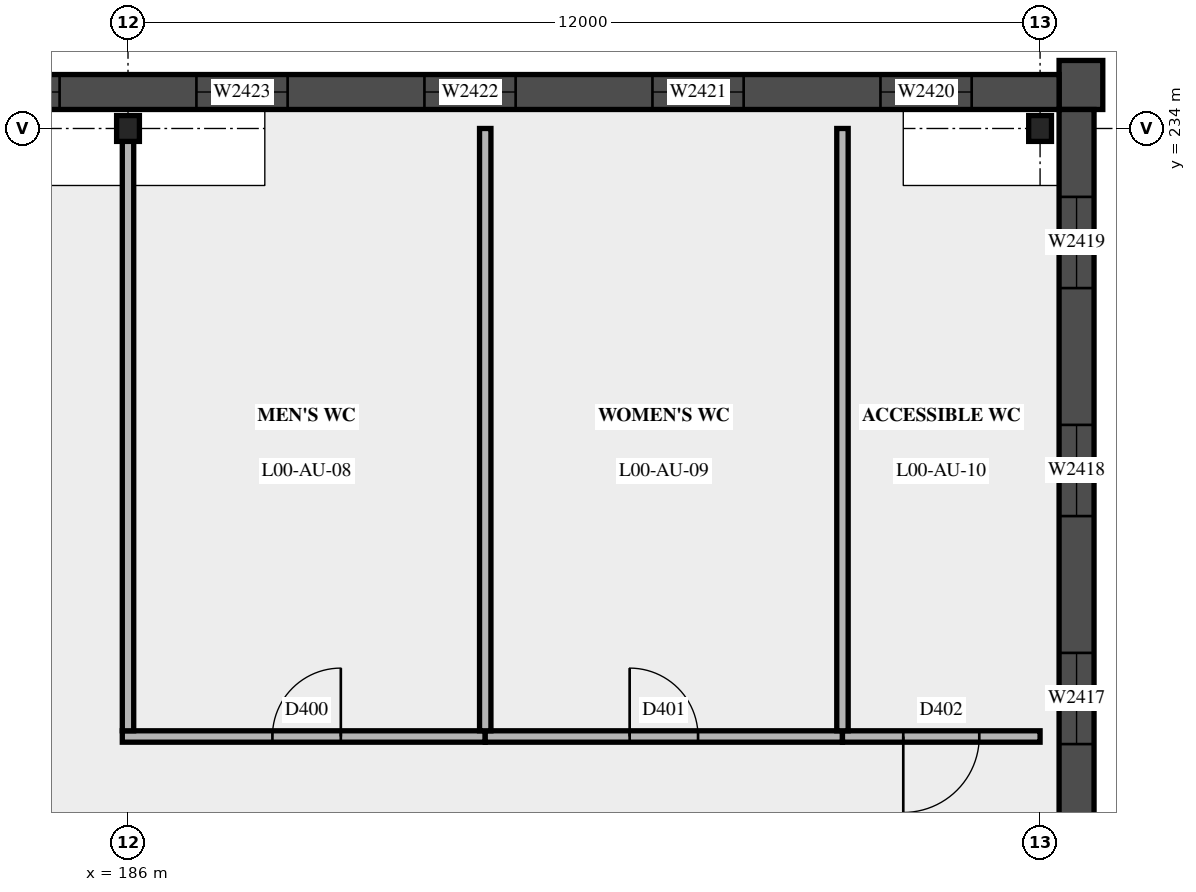
"""IFC4 building model, lengths in metres.
Left out: names, types, materials, properties, quantities, classifications, styles, units other than length and angle.
Written with IfcOpenShell. Run it as: python <this file> out.ifc"""

import sys

from ifc_helpers import new_model, si_unit, direction, frame, frame_2d, origin, origin_2d, place, context, subcontext, project, spatial, rectangle, i_section, extrude, element, fill, save


model = new_model("IFC4")
c1 = context("Model", 3, precision=1e-05, world=origin(), true_north=direction((0.0, 1.0)))
c2 = subcontext(c1, "Body", "Model", "MODEL_VIEW")
j1 = project(units=[si_unit("LENGTHUNIT", "METRE"), si_unit("PLANEANGLEUNIT", "RADIAN")], contexts=[c1])
p1 = place(None, origin())
s1 = spatial("IfcSite", under=j1, at=p1, CompositionType="ELEMENT")
p2 = place(p1, origin())
s2 = spatial("IfcBuilding", under=s1, at=p2, CompositionType="ELEMENT")
p3 = place(p2, origin())
s3 = spatial("IfcBuildingStorey", under=s2, at=p3, CompositionType="ELEMENT", Elevation=0.0)
for number, where, z_axis, x_axis in (
    (1, (186.0, 234.0, 0.0), (0.0, 0.0, 1.0), (1.0, 0.0, 0.0)),
    (2, (198.0, 234.0, 0.0), (0.0, 0.0, 1.0), (1.0, 0.0, 0.0)),
):
    element("IfcColumn", number, at=place(p3, frame(where, z_axis=z_axis, x_axis=x_axis)), inside=s3, PredefinedType="COLUMN", context=c2, shape_type="SweptSolid", body=[
        extrude(i_section(OverallWidth=0.3, OverallDepth=0.34, WebThickness=0.012, FlangeThickness=0.021, at=origin_2d()), origin(), (0.0, 0.0, 1.0), 5.4),
    ])
p4 = place(p3, frame((198.25, 234.573, 0.0), z_axis=(0.0, 0.0, 1.0), x_axis=(1.0, 0.0, 0.0)))
e3 = element("IfcWall", 3, at=p4, inside=s3, PredefinedType="SOLIDWALL", context=c2, shape_type="SweptSolid", body=[
    extrude(rectangle(XDim=0.575, YDim=0.645, at=frame_2d((0.288, 0.0))), origin(), (0.0, 0.0, 1.0), 5.01),
])
p5 = place(p3, frame((198.48, 197.75, 0.0), z_axis=(0.0, 0.0, 1.0), x_axis=(0.0, 1.0, 0.0)))
e4 = element("IfcWall", 4, at=p5, inside=s3, PredefinedType="SOLIDWALL", context=c2, shape_type="SweptSolid", body=[
    extrude(rectangle(XDim=36.5, YDim=0.46, at=frame_2d((18.25, 0.0))), origin(), (0.0, 0.0, 1.0), 5.4),
])
p6 = place(p5, frame((1.65, 0.0, 0.0), z_axis=(0.0, 0.0, 1.0), x_axis=(-1.0, 0.0, 0.0)))
e5 = element("IfcOpeningElement", 5, at=p6, cuts=e4, PredefinedType="OPENING", context=c2, shape_type="SweptSolid", body=[
    extrude(rectangle(XDim=1.0, YDim=2.1, at=frame_2d((0.5, 1.05))), frame((0.0, 0.24, 0.0), z_axis=(0.0, -1.0, 0.0), x_axis=(1.0, 0.0, 0.0)), (0.0, 0.0, 1.0), 0.48),
])
p7 = place(p5, frame((20.75, 0.0, 0.0), z_axis=(0.0, 0.0, 1.0), x_axis=(-1.0, 0.0, 0.0)))
e6 = element("IfcOpeningElement", 6, at=p7, cuts=e4, PredefinedType="OPENING", context=c2, shape_type="SweptSolid", body=[
    extrude(rectangle(XDim=1.0, YDim=2.1, at=frame_2d((0.5, 1.05))), frame((0.0, 0.24, 0.0), z_axis=(0.0, -1.0, 0.0), x_axis=(1.0, 0.0, 0.0)), (0.0, 0.0, 1.0), 0.48),
])
p8 = place(p5, frame((4.15, 0.0, 0.9)))
e7 = element("IfcOpeningElement", 7, at=p8, cuts=e4, PredefinedType="OPENING", context=c2, shape_type="SweptSolid", body=[
    extrude(rectangle(XDim=1.2, YDim=3.3, at=frame_2d((0.6, 1.65))), frame((0.0, 0.24, 0.0), z_axis=(0.0, -1.0, 0.0), x_axis=(1.0, 0.0, 0.0)), (0.0, 0.0, 1.0), 0.48),
])
p9 = place(p5, frame((7.15, 0.0, 0.9)))
e8 = element("IfcOpeningElement", 8, at=p9, cuts=e4, PredefinedType="OPENING", context=c2, shape_type="SweptSolid", body=[
    extrude(rectangle(XDim=1.2, YDim=3.3, at=frame_2d((0.6, 1.65))), frame((0.0, 0.24, 0.0), z_axis=(0.0, -1.0, 0.0), x_axis=(1.0, 0.0, 0.0)), (0.0, 0.0, 1.0), 0.48),
])
p10 = place(p5, frame((10.15, 0.0, 0.9)))
e9 = element("IfcOpeningElement", 9, at=p10, cuts=e4, PredefinedType="OPENING", context=c2, shape_type="SweptSolid", body=[
    extrude(rectangle(XDim=1.2, YDim=3.3, at=frame_2d((0.6, 1.65))), frame((0.0, 0.24, 0.0), z_axis=(0.0, -1.0, 0.0), x_axis=(1.0, 0.0, 0.0)), (0.0, 0.0, 1.0), 0.48),
])
p11 = place(p5, frame((13.15, 0.0, 0.9)))
e10 = element("IfcOpeningElement", 10, at=p11, cuts=e4, PredefinedType="OPENING", context=c2, shape_type="SweptSolid", body=[
    extrude(rectangle(XDim=1.2, YDim=3.3, at=frame_2d((0.6, 1.65))), frame((0.0, 0.24, 0.0), z_axis=(0.0, -1.0, 0.0), x_axis=(1.0, 0.0, 0.0)), (0.0, 0.0, 1.0), 0.48),
])
p12 = place(p5, frame((16.15, 0.0, 0.9)))
e11 = element("IfcOpeningElement", 11, at=p12, cuts=e4, PredefinedType="OPENING", context=c2, shape_type="SweptSolid", body=[
    extrude(rectangle(XDim=1.2, YDim=3.3, at=frame_2d((0.6, 1.65))), frame((0.0, 0.24, 0.0), z_axis=(0.0, -1.0, 0.0), x_axis=(1.0, 0.0, 0.0)), (0.0, 0.0, 1.0), 0.48),
])
p13 = place(p5, frame((22.15, 0.0, 0.9)))
e12 = element("IfcOpeningElement", 12, at=p13, cuts=e4, PredefinedType="OPENING", context=c2, shape_type="SweptSolid", body=[
    extrude(rectangle(XDim=1.2, YDim=3.3, at=frame_2d((0.6, 1.65))), frame((0.0, 0.24, 0.0), z_axis=(0.0, -1.0, 0.0), x_axis=(1.0, 0.0, 0.0)), (0.0, 0.0, 1.0), 0.48),
])
p14 = place(p5, frame((25.15, 0.0, 0.9)))
e13 = element("IfcOpeningElement", 13, at=p14, cuts=e4, PredefinedType="OPENING", context=c2, shape_type="SweptSolid", body=[
    extrude(rectangle(XDim=1.2, YDim=3.3, at=frame_2d((0.6, 1.65))), frame((0.0, 0.24, 0.0), z_axis=(0.0, -1.0, 0.0), x_axis=(1.0, 0.0, 0.0)), (0.0, 0.0, 1.0), 0.48),
])
p15 = place(p5, frame((28.15, 0.0, 0.9)))
e14 = element("IfcOpeningElement", 14, at=p15, cuts=e4, PredefinedType="OPENING", context=c2, shape_type="SweptSolid", body=[
    extrude(rectangle(XDim=1.2, YDim=3.3, at=frame_2d((0.6, 1.65))), frame((0.0, 0.24, 0.0), z_axis=(0.0, -1.0, 0.0), x_axis=(1.0, 0.0, 0.0)), (0.0, 0.0, 1.0), 0.48),
])
p16 = place(p5, frame((31.15, 0.0, 0.9)))
e15 = element("IfcOpeningElement", 15, at=p16, cuts=e4, PredefinedType="OPENING", context=c2, shape_type="SweptSolid", body=[
    extrude(rectangle(XDim=1.2, YDim=3.3, at=frame_2d((0.6, 1.65))), frame((0.0, 0.24, 0.0), z_axis=(0.0, -1.0, 0.0), x_axis=(1.0, 0.0, 0.0)), (0.0, 0.0, 1.0), 0.48),
])
p17 = place(p5, frame((34.15, 0.0, 0.9)))
e16 = element("IfcOpeningElement", 16, at=p17, cuts=e4, PredefinedType="OPENING", context=c2, shape_type="SweptSolid", body=[
    extrude(rectangle(XDim=1.2, YDim=3.3, at=frame_2d((0.6, 1.65))), frame((0.0, 0.24, 0.0), z_axis=(0.0, -1.0, 0.0), x_axis=(1.0, 0.0, 0.0)), (0.0, 0.0, 1.0), 0.48),
])
p18 = place(p3, frame((198.25, 234.48, 0.0), z_axis=(0.0, 0.0, 1.0), x_axis=(-1.0, 0.0, 0.0)))
e17 = element("IfcWall", 17, at=p18, inside=s3, PredefinedType="SOLIDWALL", context=c2, shape_type="SweptSolid", body=[
    extrude(rectangle(XDim=36.5, YDim=0.46, at=frame_2d((18.25, 0.0))), origin(), (0.0, 0.0, 1.0), 5.4),
])
p19 = place(p18, frame((18.75, 0.0, 0.0), z_axis=(0.0, 0.0, 1.0), x_axis=(-1.0, 0.0, 0.0)))
e18 = element("IfcOpeningElement", 18, at=p19, cuts=e17, PredefinedType="OPENING", context=c2, shape_type="SweptSolid", body=[
    extrude(rectangle(XDim=1.0, YDim=2.1, at=frame_2d((0.5, 1.05))), frame((0.0, 0.24, 0.0), z_axis=(0.0, -1.0, 0.0), x_axis=(1.0, 0.0, 0.0)), (0.0, 0.0, 1.0), 0.48),
])
p20 = place(p18, frame((30.75, 0.0, 0.0), z_axis=(0.0, 0.0, 1.0), x_axis=(-1.0, 0.0, 0.0)))
e19 = element("IfcOpeningElement", 19, at=p20, cuts=e17, PredefinedType="OPENING", context=c2, shape_type="SweptSolid", body=[
    extrude(rectangle(XDim=1.0, YDim=2.1, at=frame_2d((0.5, 1.05))), frame((0.0, 0.24, 0.0), z_axis=(0.0, -1.0, 0.0), x_axis=(1.0, 0.0, 0.0)), (0.0, 0.0, 1.0), 0.48),
])
p21 = place(p18, frame((1.15, 0.0, 0.9)))
e20 = element("IfcOpeningElement", 20, at=p21, cuts=e17, PredefinedType="OPENING", context=c2, shape_type="SweptSolid", body=[
    extrude(rectangle(XDim=1.2, YDim=3.3, at=frame_2d((0.6, 1.65))), frame((0.0, 0.24, 0.0), z_axis=(0.0, -1.0, 0.0), x_axis=(1.0, 0.0, 0.0)), (0.0, 0.0, 1.0), 0.48),
])
p22 = place(p18, frame((4.15, 0.0, 0.9)))
e21 = element("IfcOpeningElement", 21, at=p22, cuts=e17, PredefinedType="OPENING", context=c2, shape_type="SweptSolid", body=[
    extrude(rectangle(XDim=1.2, YDim=3.3, at=frame_2d((0.6, 1.65))), frame((0.0, 0.24, 0.0), z_axis=(0.0, -1.0, 0.0), x_axis=(1.0, 0.0, 0.0)), (0.0, 0.0, 1.0), 0.48),
])
p23 = place(p18, frame((7.15, 0.0, 0.9)))
e22 = element("IfcOpeningElement", 22, at=p23, cuts=e17, PredefinedType="OPENING", context=c2, shape_type="SweptSolid", body=[
    extrude(rectangle(XDim=1.2, YDim=3.3, at=frame_2d((0.6, 1.65))), frame((0.0, 0.24, 0.0), z_axis=(0.0, -1.0, 0.0), x_axis=(1.0, 0.0, 0.0)), (0.0, 0.0, 1.0), 0.48),
])
p24 = place(p18, frame((10.15, 0.0, 0.9)))
e23 = element("IfcOpeningElement", 23, at=p24, cuts=e17, PredefinedType="OPENING", context=c2, shape_type="SweptSolid", body=[
    extrude(rectangle(XDim=1.2, YDim=3.3, at=frame_2d((0.6, 1.65))), frame((0.0, 0.24, 0.0), z_axis=(0.0, -1.0, 0.0), x_axis=(1.0, 0.0, 0.0)), (0.0, 0.0, 1.0), 0.48),
])
p25 = place(p18, frame((13.15, 0.0, 0.9)))
e24 = element("IfcOpeningElement", 24, at=p25, cuts=e17, PredefinedType="OPENING", context=c2, shape_type="SweptSolid", body=[
    extrude(rectangle(XDim=1.2, YDim=3.3, at=frame_2d((0.6, 1.65))), frame((0.0, 0.24, 0.0), z_axis=(0.0, -1.0, 0.0), x_axis=(1.0, 0.0, 0.0)), (0.0, 0.0, 1.0), 0.48),
])
p26 = place(p18, frame((22.15, 0.0, 0.9)))
e25 = element("IfcOpeningElement", 25, at=p26, cuts=e17, PredefinedType="OPENING", context=c2, shape_type="SweptSolid", body=[
    extrude(rectangle(XDim=1.2, YDim=3.3, at=frame_2d((0.6, 1.65))), frame((0.0, 0.24, 0.0), z_axis=(0.0, -1.0, 0.0), x_axis=(1.0, 0.0, 0.0)), (0.0, 0.0, 1.0), 0.48),
])
p27 = place(p18, frame((25.15, 0.0, 0.9)))
e26 = element("IfcOpeningElement", 26, at=p27, cuts=e17, PredefinedType="OPENING", context=c2, shape_type="SweptSolid", body=[
    extrude(rectangle(XDim=1.2, YDim=3.3, at=frame_2d((0.6, 1.65))), frame((0.0, 0.24, 0.0), z_axis=(0.0, -1.0, 0.0), x_axis=(1.0, 0.0, 0.0)), (0.0, 0.0, 1.0), 0.48),
])
p28 = place(p18, frame((34.15, 0.0, 0.9)))
e27 = element("IfcOpeningElement", 27, at=p28, cuts=e17, PredefinedType="OPENING", context=c2, shape_type="SweptSolid", body=[
    extrude(rectangle(XDim=1.2, YDim=3.3, at=frame_2d((0.6, 1.65))), frame((0.0, 0.24, 0.0), z_axis=(0.0, -1.0, 0.0), x_axis=(1.0, 0.0, 0.0)), (0.0, 0.0, 1.0), 0.48),
])
p29 = place(p3, frame((185.925, 226.0, 0.0), z_axis=(0.0, 0.0, 1.0), x_axis=(1.0, 0.0, 0.0)))
e28 = element("IfcWall", 28, at=p29, inside=s3, PredefinedType="PARTITIONING", context=c2, shape_type="SweptSolid", body=[
    extrude(rectangle(XDim=4.775, YDim=0.15, at=frame_2d((2.387, 0.0))), origin(), (0.0, 0.0, 1.0), 5.15),
])
p30 = place(p29, frame((1.975, 0.0, 0.0)))
e29 = element("IfcOpeningElement", 29, at=p30, cuts=e28, PredefinedType="OPENING", context=c2, shape_type="SweptSolid", body=[
    extrude(rectangle(XDim=0.9, YDim=2.1, at=frame_2d((0.45, 1.05))), frame((0.0, 0.085, 0.0), z_axis=(0.0, -1.0, 0.0), x_axis=(1.0, 0.0, 0.0)), (0.0, 0.0, 1.0), 0.17),
])
p31 = place(p3, frame((190.7, 226.0, 0.0), z_axis=(0.0, 0.0, 1.0), x_axis=(1.0, 0.0, 0.0)))
e30 = element("IfcWall", 30, at=p31, inside=s3, PredefinedType="PARTITIONING", context=c2, shape_type="SweptSolid", body=[
    extrude(rectangle(XDim=4.7, YDim=0.15, at=frame_2d((2.35, 0.0))), origin(), (0.0, 0.0, 1.0), 5.15),
])
p32 = place(p31, frame((1.9, 0.0, 0.0)))
e31 = element("IfcOpeningElement", 31, at=p32, cuts=e30, PredefinedType="OPENING", context=c2, shape_type="SweptSolid", body=[
    extrude(rectangle(XDim=0.9, YDim=2.1, at=frame_2d((0.45, 1.05))), frame((0.0, 0.085, 0.0), z_axis=(0.0, -1.0, 0.0), x_axis=(1.0, 0.0, 0.0)), (0.0, 0.0, 1.0), 0.17),
])
p33 = place(p3, frame((195.4, 226.0, 0.0), z_axis=(0.0, 0.0, 1.0), x_axis=(1.0, 0.0, 0.0)))
e32 = element("IfcWall", 32, at=p33, inside=s3, PredefinedType="PARTITIONING", context=c2, shape_type="SweptSolid", body=[
    extrude(rectangle(XDim=2.6, YDim=0.15, at=frame_2d((1.3, 0.0))), origin(), (0.0, 0.0, 1.0), 5.15),
])
p34 = place(p33, frame((0.8, 0.0, 0.0)))
e33 = element("IfcOpeningElement", 33, at=p34, cuts=e32, PredefinedType="OPENING", context=c2, shape_type="SweptSolid", body=[
    extrude(rectangle(XDim=1.0, YDim=2.1, at=frame_2d((0.5, 1.05))), frame((0.0, 0.085, 0.0), z_axis=(0.0, -1.0, 0.0), x_axis=(1.0, 0.0, 0.0)), (0.0, 0.0, 1.0), 0.17),
])
for number, where, z_axis, x_axis in (
    (34, (186.0, 226.075, 0.0), (0.0, 0.0, 1.0), (0.0, 1.0, 0.0)),
    (35, (190.7, 226.075, 0.0), (0.0, 0.0, 1.0), (0.0, 1.0, 0.0)),
    (36, (195.4, 226.075, 0.0), (0.0, 0.0, 1.0), (0.0, 1.0, 0.0)),
):
    element("IfcWall", number, at=place(p3, frame(where, z_axis=z_axis, x_axis=x_axis)), inside=s3, PredefinedType="PARTITIONING", context=c2, shape_type="SweptSolid", body=[
        extrude(rectangle(XDim=7.925, YDim=0.15, at=frame_2d((3.962, 0.0))), origin(), (0.0, 0.0, 1.0), 5.15),
    ])
p35 = place(p15, origin())
e37 = element("IfcWindow", 37, at=p35, inside=s3, PartitioningType="SINGLE_PANEL", PredefinedType="WINDOW", context=c2, shape_type="SweptSolid", body=[
    extrude(rectangle(XDim=1.2, YDim=3.3, at=frame_2d((0.6, 1.65))), frame((0.0, 0.03, 0.0), z_axis=(0.0, -1.0, 0.0), x_axis=(1.0, 0.0, 0.0)), (0.0, 0.0, 1.0), 0.06),
])
fill(e14, e37)
p36 = place(p16, origin())
e38 = element("IfcWindow", 38, at=p36, inside=s3, PartitioningType="SINGLE_PANEL", PredefinedType="WINDOW", context=c2, shape_type="SweptSolid", body=[
    extrude(rectangle(XDim=1.2, YDim=3.3, at=frame_2d((0.6, 1.65))), frame((0.0, 0.03, 0.0), z_axis=(0.0, -1.0, 0.0), x_axis=(1.0, 0.0, 0.0)), (0.0, 0.0, 1.0), 0.06),
])
fill(e15, e38)
p37 = place(p17, origin())
e39 = element("IfcWindow", 39, at=p37, inside=s3, PartitioningType="SINGLE_PANEL", PredefinedType="WINDOW", context=c2, shape_type="SweptSolid", body=[
    extrude(rectangle(XDim=1.2, YDim=3.3, at=frame_2d((0.6, 1.65))), frame((0.0, 0.03, 0.0), z_axis=(0.0, -1.0, 0.0), x_axis=(1.0, 0.0, 0.0)), (0.0, 0.0, 1.0), 0.06),
])
fill(e16, e39)
p38 = place(p21, origin())
e40 = element("IfcWindow", 40, at=p38, inside=s3, PartitioningType="SINGLE_PANEL", PredefinedType="WINDOW", context=c2, shape_type="SweptSolid", body=[
    extrude(rectangle(XDim=1.2, YDim=3.3, at=frame_2d((0.6, 1.65))), frame((0.0, 0.03, 0.0), z_axis=(0.0, -1.0, 0.0), x_axis=(1.0, 0.0, 0.0)), (0.0, 0.0, 1.0), 0.06),
])
fill(e20, e40)
p39 = place(p22, origin())
e41 = element("IfcWindow", 41, at=p39, inside=s3, PartitioningType="SINGLE_PANEL", PredefinedType="WINDOW", context=c2, shape_type="SweptSolid", body=[
    extrude(rectangle(XDim=1.2, YDim=3.3, at=frame_2d((0.6, 1.65))), frame((0.0, 0.03, 0.0), z_axis=(0.0, -1.0, 0.0), x_axis=(1.0, 0.0, 0.0)), (0.0, 0.0, 1.0), 0.06),
])
fill(e21, e41)
p40 = place(p23, origin())
e42 = element("IfcWindow", 42, at=p40, inside=s3, PartitioningType="SINGLE_PANEL", PredefinedType="WINDOW", context=c2, shape_type="SweptSolid", body=[
    extrude(rectangle(XDim=1.2, YDim=3.3, at=frame_2d((0.6, 1.65))), frame((0.0, 0.03, 0.0), z_axis=(0.0, -1.0, 0.0), x_axis=(1.0, 0.0, 0.0)), (0.0, 0.0, 1.0), 0.06),
])
fill(e22, e42)
p41 = place(p24, origin())
e43 = element("IfcWindow", 43, at=p41, inside=s3, PartitioningType="SINGLE_PANEL", PredefinedType="WINDOW", context=c2, shape_type="SweptSolid", body=[
    extrude(rectangle(XDim=1.2, YDim=3.3, at=frame_2d((0.6, 1.65))), frame((0.0, 0.03, 0.0), z_axis=(0.0, -1.0, 0.0), x_axis=(1.0, 0.0, 0.0)), (0.0, 0.0, 1.0), 0.06),
])
fill(e23, e43)
p42 = place(p25, origin())
e44 = element("IfcWindow", 44, at=p42, inside=s3, PartitioningType="SINGLE_PANEL", PredefinedType="WINDOW", context=c2, shape_type="SweptSolid", body=[
    extrude(rectangle(XDim=1.2, YDim=3.3, at=frame_2d((0.6, 1.65))), frame((0.0, 0.03, 0.0), z_axis=(0.0, -1.0, 0.0), x_axis=(1.0, 0.0, 0.0)), (0.0, 0.0, 1.0), 0.06),
])
fill(e24, e44)
p43 = place(p30, origin())
e45 = element("IfcDoor", 45, at=p43, inside=s3, OperationType="SINGLE_SWING_RIGHT", PredefinedType="DOOR", context=c2, shape_type="SweptSolid", body=[
    extrude(rectangle(XDim=0.9, YDim=2.1, at=frame_2d((0.45, 1.05))), frame((0.0, 0.025, 0.0), z_axis=(0.0, -1.0, 0.0), x_axis=(1.0, 0.0, 0.0)), (0.0, 0.0, 1.0), 0.05),
])
fill(e29, e45)
p44 = place(p32, origin())
e46 = element("IfcDoor", 46, at=p44, inside=s3, OperationType="SINGLE_SWING_LEFT", PredefinedType="DOOR", context=c2, shape_type="SweptSolid", body=[
    extrude(rectangle(XDim=0.9, YDim=2.1, at=frame_2d((0.45, 1.05))), frame((0.0, 0.025, 0.0), z_axis=(0.0, -1.0, 0.0), x_axis=(1.0, 0.0, 0.0)), (0.0, 0.0, 1.0), 0.05),
])
fill(e31, e46)
p45 = place(p34, origin())
e47 = element("IfcDoor", 47, at=p45, inside=s3, OperationType="SINGLE_SWING_RIGHT", PredefinedType="DOOR", context=c2, shape_type="SweptSolid", body=[
    extrude(rectangle(XDim=1.0, YDim=2.1, at=frame_2d((0.5, 1.05))), frame((0.0, 0.025, 0.0), z_axis=(0.0, -1.0, 0.0), x_axis=(1.0, 0.0, 0.0)), (0.0, 0.0, 1.0), 0.05),
])
fill(e33, e47)
save(model, sys.argv[1])
